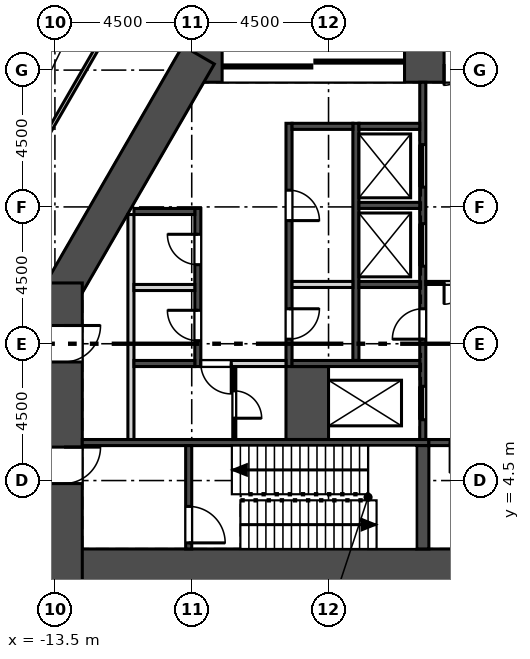
"""IFC4 building model, lengths in metres.
Left out: names, types, materials, properties, quantities, classifications, styles, units other than length and angle.
Written with IfcOpenShell. Run it as: python <this file> out.ifc"""

import sys

from ifc_helpers import new_model, si_unit, direction, frame, frame_2d, origin, place, context, subcontext, project, spatial, rectangle, extrude, element, fill, save


model = new_model("IFC4")
c1 = context("Model", 3, precision=1e-05, world=origin(), true_north=direction((0.0, 1.0)))
c2 = subcontext(c1, "Body", "Model", "MODEL_VIEW")
j1 = project(units=[si_unit("LENGTHUNIT", "METRE"), si_unit("PLANEANGLEUNIT", "RADIAN")], contexts=[c1])
p1 = place(None, origin())
s1 = spatial("IfcSite", under=j1, at=p1, CompositionType="ELEMENT")
p2 = place(p1, origin())
s2 = spatial("IfcBuilding", under=s1, at=p2, CompositionType="ELEMENT")
p3 = place(p2, frame((0.0, 0.0, 137.5)))
s3 = spatial("IfcBuildingStorey", under=s2, at=p3, CompositionType="ELEMENT", Elevation=137.5)
p4 = place(p3, frame((-13.8, 1.65, 0.0), z_axis=(0.0, 0.0, 1.0), x_axis=(1.0, 0.0, 0.0)))
e1 = element("IfcWall", 1, at=p4, inside=s3, PredefinedType="SHEAR", context=c2, shape_type="SweptSolid", body=[
    extrude(rectangle(XDim=27.6, YDim=1.2, at=frame_2d((13.8, 0.0))), origin(), (0.0, 0.0, 1.0), 5.4),
])
p5 = place(p3, frame((9.296, 18.2, 0.0), z_axis=(0.0, 0.0, 1.0), x_axis=(-1.0, 0.0, 0.0)))
e2 = element("IfcWall", 2, at=p5, inside=s3, PredefinedType="SHEAR", context=c2, shape_type="SweptSolid", body=[
    extrude(rectangle(XDim=18.592, YDim=1.2, at=frame_2d((9.296, 0.0))), origin(), (0.0, 0.0, 1.0), 5.4),
])
p6 = place(p5, frame((8.596, 0.0, 0.0)))
e3 = element("IfcOpeningElement", 3, at=p6, cuts=e2, PredefinedType="OPENING", context=c2, shape_type="SweptSolid", body=[
    extrude(rectangle(XDim=1.4, YDim=2.1, at=frame_2d((0.7, 1.05))), frame((0.0, 0.61, 0.0), z_axis=(0.0, -1.0, 0.0), x_axis=(1.0, 0.0, 0.0)), (0.0, 0.0, 1.0), 1.22),
])
p7 = place(p5, frame((11.296, 0.0, 0.0)))
e4 = element("IfcOpeningElement", 4, at=p7, cuts=e2, PredefinedType="OPENING", context=c2, shape_type="SweptSolid", body=[
    extrude(rectangle(XDim=6.0, YDim=2.4, at=frame_2d((3.0, 1.2))), frame((0.0, 0.61, 0.0), z_axis=(0.0, -1.0, 0.0), x_axis=(1.0, 0.0, 0.0)), (0.0, 0.0, 1.0), 1.22),
])
p8 = place(p5, frame((1.296, 0.0, 0.0)))
e5 = element("IfcOpeningElement", 5, at=p8, cuts=e2, PredefinedType="OPENING", context=c2, shape_type="SweptSolid", body=[
    extrude(rectangle(XDim=6.0, YDim=2.4, at=frame_2d((3.0, 1.2))), frame((0.0, 0.61, 0.0), z_axis=(0.0, -1.0, 0.0), x_axis=(1.0, 0.0, 0.0)), (0.0, 0.0, 1.0), 1.22),
])
p9 = place(p3, frame((-8.777, 18.5, 0.0), z_axis=(0.0, 0.0, 1.0), x_axis=(-0.499998513025, -0.866026262288, 0.0)))
e6 = element("IfcWall", 6, at=p9, inside=s3, PredefinedType="SHEAR", context=c2, shape_type="SweptSolid", body=[
    extrude(rectangle(XDim=9.008, YDim=1.2, at=frame_2d((4.504, 0.0))), origin(), (0.0, 0.0, 1.0), 5.4),
])
p10 = place(p3, frame((-13.2, 10.999, 0.0), z_axis=(0.0, 0.0, 1.0), x_axis=(0.0, -1.0, 0.0)))
e7 = element("IfcWall", 7, at=p10, inside=s3, PredefinedType="SHEAR", context=c2, shape_type="SweptSolid", body=[
    extrude(rectangle(XDim=9.949, YDim=1.2, at=frame_2d((4.975, 0.0))), origin(), (0.0, 0.0, 1.0), 5.4),
])
p11 = place(p10, frame((5.399, 0.0, 0.0)))
e8 = element("IfcOpeningElement", 8, at=p11, cuts=e7, PredefinedType="OPENING", context=c2, shape_type="SweptSolid", body=[
    extrude(rectangle(XDim=1.2, YDim=2.1, at=frame_2d((0.6, 1.05))), frame((0.0, 0.61, 0.0), z_axis=(0.0, -1.0, 0.0), x_axis=(1.0, 0.0, 0.0)), (0.0, 0.0, 1.0), 1.22),
])
p12 = place(p10, frame((1.399, 0.0, 0.0)))
e9 = element("IfcOpeningElement", 9, at=p12, cuts=e7, PredefinedType="OPENING", context=c2, shape_type="SweptSolid", body=[
    extrude(rectangle(XDim=1.2, YDim=2.1, at=frame_2d((0.6, 1.05))), frame((0.0, 0.61, 0.0), z_axis=(0.0, -1.0, 0.0), x_axis=(1.0, 0.0, 0.0)), (0.0, 0.0, 1.0), 1.22),
])
p13 = place(p3, frame((-11.0, 5.85, 0.0), z_axis=(0.0, 0.0, 1.0), x_axis=(0.0, 1.0, 0.0)))
e10 = element("IfcWall", 10, at=p13, inside=s3, PredefinedType="SOLIDWALL", context=c2, shape_type="SweptSolid", body=[
    extrude(rectangle(XDim=7.4, YDim=0.2, at=frame_2d((3.7, 0.0))), origin(), (0.0, 0.0, 1.0), 5.0),
])
p14 = place(p3, frame((-8.8, 8.25, -0.4), z_axis=(0.0, 0.0, 1.0), x_axis=(0.0, 1.0, 0.0)))
e11 = element("IfcWall", 11, at=p14, inside=s3, PredefinedType="SOLIDWALL", context=c2, shape_type="SweptSolid", body=[
    extrude(rectangle(XDim=5.2, YDim=0.2, at=frame_2d((2.6, 0.0))), origin(), (0.0, 0.0, 1.0), 5.4),
])
p15 = place(p14, frame((0.85, 0.0, 0.4)))
e12 = element("IfcOpeningElement", 12, at=p15, cuts=e11, PredefinedType="OPENING", context=c2, shape_type="SweptSolid", body=[
    extrude(rectangle(XDim=1.0, YDim=2.1, at=frame_2d((0.5, 1.05))), frame((0.0, 0.11, 0.0), z_axis=(0.0, -1.0, 0.0), x_axis=(1.0, 0.0, 0.0)), (0.0, 0.0, 1.0), 0.22),
])
p16 = place(p14, frame((3.35, 0.0, 0.4)))
e13 = element("IfcOpeningElement", 13, at=p16, cuts=e11, PredefinedType="OPENING", context=c2, shape_type="SweptSolid", body=[
    extrude(rectangle(XDim=1.0, YDim=2.1, at=frame_2d((0.5, 1.05))), frame((0.0, 0.11, 0.0), z_axis=(0.0, -1.0, 0.0), x_axis=(1.0, 0.0, 0.0)), (0.0, 0.0, 1.0), 0.22),
])
p17 = place(p3, frame((-5.8, 8.25, -0.4), z_axis=(0.0, 0.0, 1.0), x_axis=(0.0, 1.0, 0.0)))
e14 = element("IfcWall", 14, at=p17, inside=s3, PredefinedType="SOLIDWALL", context=c2, shape_type="SweptSolid", body=[
    extrude(rectangle(XDim=8.0, YDim=0.2, at=frame_2d((4.0, 0.0))), origin(), (0.0, 0.0, 1.0), 5.4),
])
p18 = place(p17, frame((0.9, 0.0, 0.4)))
e15 = element("IfcOpeningElement", 15, at=p18, cuts=e14, PredefinedType="OPENING", context=c2, shape_type="SweptSolid", body=[
    extrude(rectangle(XDim=1.0, YDim=2.1, at=frame_2d((0.5, 1.05))), frame((0.0, 0.11, 0.0), z_axis=(0.0, -1.0, 0.0), x_axis=(1.0, 0.0, 0.0)), (0.0, 0.0, 1.0), 0.22),
])
p19 = place(p17, frame((4.8, 0.0, 0.4)))
e16 = element("IfcOpeningElement", 16, at=p19, cuts=e14, PredefinedType="OPENING", context=c2, shape_type="SweptSolid", body=[
    extrude(rectangle(XDim=1.0, YDim=2.1, at=frame_2d((0.5, 1.05))), frame((0.0, 0.11, 0.0), z_axis=(0.0, -1.0, 0.0), x_axis=(1.0, 0.0, 0.0)), (0.0, 0.0, 1.0), 0.22),
])
p20 = place(p3, frame((-3.6, 8.45, -0.4), z_axis=(0.0, 0.0, 1.0), x_axis=(0.0, 1.0, 0.0)))
e17 = element("IfcWall", 17, at=p20, inside=s3, PredefinedType="SOLIDWALL", context=c2, shape_type="SweptSolid", body=[
    extrude(rectangle(XDim=7.8, YDim=0.2, at=frame_2d((3.9, 0.0))), origin(), (0.0, 0.0, 1.0), 5.4),
])
p21 = place(p3, frame((-1.4, 5.85, -0.4), z_axis=(0.0, 0.0, 1.0), x_axis=(0.0, 1.0, 0.0)))
e18 = element("IfcWall", 18, at=p21, inside=s3, PredefinedType="SOLIDWALL", context=c2, shape_type="SweptSolid", body=[
    extrude(rectangle(XDim=11.75, YDim=0.2, at=frame_2d((5.875, 0.0))), origin(), (0.0, 0.0, 1.0), 5.4),
])
p22 = place(p21, frame((5.7, 0.0, 0.4)))
e19 = element("IfcOpeningElement", 19, at=p22, cuts=e18, PredefinedType="OPENING", context=c2, shape_type="SweptSolid", body=[
    extrude(rectangle(XDim=1.4, YDim=2.1, at=frame_2d((0.7, 1.05))), frame((0.0, 0.11, 0.0), z_axis=(0.0, -1.0, 0.0), x_axis=(1.0, 0.0, 0.0)), (0.0, 0.0, 1.0), 0.22),
])
p23 = place(p21, frame((8.3, 0.0, 0.4)))
e20 = element("IfcOpeningElement", 20, at=p23, cuts=e18, PredefinedType="OPENING", context=c2, shape_type="SweptSolid", body=[
    extrude(rectangle(XDim=1.4, YDim=2.1, at=frame_2d((0.7, 1.05))), frame((0.0, 0.11, 0.0), z_axis=(0.0, -1.0, 0.0), x_axis=(1.0, 0.0, 0.0)), (0.0, 0.0, 1.0), 0.22),
])
p24 = place(p21, frame((0.65, 0.0, 0.4)))
e21 = element("IfcOpeningElement", 21, at=p24, cuts=e18, PredefinedType="OPENING", context=c2, shape_type="SweptSolid", body=[
    extrude(rectangle(XDim=1.1, YDim=2.1, at=frame_2d((0.55, 1.05))), frame((0.0, 0.11, 0.0), z_axis=(0.0, -1.0, 0.0), x_axis=(1.0, 0.0, 0.0)), (0.0, 0.0, 1.0), 0.22),
])
p25 = place(p21, frame((3.3, 0.0, 0.4)))
e22 = element("IfcOpeningElement", 22, at=p25, cuts=e18, PredefinedType="OPENING", context=c2, shape_type="SweptSolid", body=[
    extrude(rectangle(XDim=1.0, YDim=2.1, at=frame_2d((0.5, 1.05))), frame((0.0, 0.11, 0.0), z_axis=(0.0, -1.0, 0.0), x_axis=(1.0, 0.0, 0.0)), (0.0, 0.0, 1.0), 0.22),
])
p26 = place(p3, frame((-5.2, 5.85, -0.4), z_axis=(0.0, 0.0, 1.0), x_axis=(0.0, 1.0, 0.0)))
e23 = element("IfcWall", 23, at=p26, inside=s3, PredefinedType="SOLIDWALL", context=c2, shape_type="SweptSolid", body=[
    extrude(rectangle(XDim=2.4, YDim=1.4, at=frame_2d((1.2, 0.0))), origin(), (0.0, 0.0, 1.0), 5.4),
])
p27 = place(p3, frame((-10.9, 8.35, -0.4), z_axis=(0.0, 0.0, 1.0), x_axis=(1.0, 0.0, 0.0)))
e24 = element("IfcWall", 24, at=p27, inside=s3, PredefinedType="SOLIDWALL", context=c2, shape_type="SweptSolid", body=[
    extrude(rectangle(XDim=2.0, YDim=0.2, at=frame_2d((1.0, 0.0))), origin(), (0.0, 0.0, 1.0), 5.4),
])
p28 = place(p3, frame((-5.7, 8.35, -0.4), z_axis=(0.0, 0.0, 1.0), x_axis=(1.0, 0.0, 0.0)))
e25 = element("IfcWall", 25, at=p28, inside=s3, PredefinedType="SOLIDWALL", context=c2, shape_type="SweptSolid", body=[
    extrude(rectangle(XDim=4.2, YDim=0.2, at=frame_2d((2.1, 0.0))), origin(), (0.0, 0.0, 1.0), 5.4),
])
p29 = place(p3, frame((-12.6, 5.75, -0.4), z_axis=(0.0, 0.0, 1.0), x_axis=(1.0, 0.0, 0.0)))
e26 = element("IfcWall", 26, at=p29, inside=s3, PredefinedType="SOLIDWALL", context=c2, shape_type="SweptSolid", body=[
    extrude(rectangle(XDim=11.4, YDim=0.2, at=frame_2d((5.7, 0.0))), origin(), (0.0, 0.0, 1.0), 5.4),
])
p30 = place(p3, frame((-1.2, 5.75, -0.4), z_axis=(0.0, 0.0, 1.0), x_axis=(1.0, 0.0, 0.0)))
e27 = element("IfcWall", 27, at=p30, inside=s3, PredefinedType="SOLIDWALL", context=c2, shape_type="SweptSolid", body=[
    extrude(rectangle(XDim=2.4, YDim=0.2, at=frame_2d((1.2, 0.0))), origin(), (0.0, 0.0, 1.0), 5.4),
])
p31 = place(p30, frame((0.7, 0.0, 0.4)))
e28 = element("IfcOpeningElement", 28, at=p31, cuts=e27, PredefinedType="OPENING", context=c2, shape_type="SweptSolid", body=[
    extrude(rectangle(XDim=1.0, YDim=2.1, at=frame_2d((0.5, 1.05))), frame((0.0, 0.11, 0.0), z_axis=(0.0, -1.0, 0.0), x_axis=(1.0, 0.0, 0.0)), (0.0, 0.0, 1.0), 0.22),
])
p32 = place(p3, frame((-9.1, 2.25, -0.4), z_axis=(0.0, 0.0, 1.0), x_axis=(0.0, 1.0, 0.0)))
e29 = element("IfcWall", 29, at=p32, inside=s3, PredefinedType="SOLIDWALL", context=c2, shape_type="SweptSolid", body=[
    extrude(rectangle(XDim=3.4, YDim=0.2, at=frame_2d((1.7, 0.0))), origin(), (0.0, 0.0, 1.0), 5.4),
])
p33 = place(p32, frame((0.2, 0.0, 0.4)))
e30 = element("IfcOpeningElement", 30, at=p33, cuts=e29, PredefinedType="OPENING", context=c2, shape_type="SweptSolid", body=[
    extrude(rectangle(XDim=1.2, YDim=2.1, at=frame_2d((0.6, 1.05))), frame((0.0, 0.11, 0.0), z_axis=(0.0, -1.0, 0.0), x_axis=(1.0, 0.0, 0.0)), (0.0, 0.0, 1.0), 0.22),
])
p34 = place(p3, frame((-1.4, 2.25, -0.4), z_axis=(0.0, 0.0, 1.0), x_axis=(0.0, 1.0, 0.0)))
e31 = element("IfcWall", 31, at=p34, inside=s3, PredefinedType="SOLIDWALL", context=c2, shape_type="SweptSolid", body=[
    extrude(rectangle(XDim=3.4, YDim=0.4, at=frame_2d((1.7, 0.0))), origin(), (0.0, 0.0, 1.0), 5.4),
])
p35 = place(p3, frame((-10.9, 10.85, 0.0), z_axis=(0.0, 0.0, 1.0), x_axis=(1.0, 0.0, 0.0)))
e32 = element("IfcWall", 32, at=p35, inside=s3, PredefinedType="SOLIDWALL", context=c2, shape_type="SweptSolid", body=[
    extrude(rectangle(XDim=2.0, YDim=0.2, at=frame_2d((1.0, 0.0))), origin(), (0.0, 0.0, 1.0), 5.0),
])
p36 = place(p3, frame((-10.9, 13.35, -0.4), z_axis=(0.0, 0.0, 1.0), x_axis=(1.0, 0.0, 0.0)))
e33 = element("IfcWall", 33, at=p36, inside=s3, PredefinedType="SOLIDWALL", context=c2, shape_type="SweptSolid", body=[
    extrude(rectangle(XDim=2.0, YDim=0.2, at=frame_2d((1.0, 0.0))), origin(), (0.0, 0.0, 1.0), 5.4),
])
p37 = place(p3, frame((-5.7, 10.95, 0.0), z_axis=(0.0, 0.0, 1.0), x_axis=(1.0, 0.0, 0.0)))
e34 = element("IfcWall", 34, at=p37, inside=s3, PredefinedType="SOLIDWALL", context=c2, shape_type="SweptSolid", body=[
    extrude(rectangle(XDim=2.0, YDim=0.2, at=frame_2d((1.0, 0.0))), origin(), (0.0, 0.0, 1.0), 5.0),
])
for number, where, z_axis, x_axis in (
    (35, (-5.7, 16.15, -0.4), (0.0, 0.0, 1.0), (1.0, 0.0, 0.0)),
    (36, (-3.5, 10.95, -0.4), (0.0, 0.0, 1.0), (1.0, 0.0, 0.0)),
    (37, (-3.5, 13.55, -0.4), (0.0, 0.0, 1.0), (1.0, 0.0, 0.0)),
    (38, (-3.5, 16.15, -0.4), (0.0, 0.0, 1.0), (1.0, 0.0, 0.0)),
):
    element("IfcWall", number, at=place(p3, frame(where, z_axis=z_axis, x_axis=x_axis)), inside=s3, PredefinedType="SOLIDWALL", context=c2, shape_type="SweptSolid", body=[
        extrude(rectangle(XDim=2.0, YDim=0.2, at=frame_2d((1.0, 0.0))), origin(), (0.0, 0.0, 1.0), 5.4),
    ])
p38 = place(p3, frame((-7.6, 5.85, 0.0), z_axis=(0.0, 0.0, 1.0), x_axis=(0.0, 1.0, 0.0)))
e39 = element("IfcWall", 39, at=p38, inside=s3, PredefinedType="PARTITIONING", context=c2, shape_type="SweptSolid", body=[
    extrude(rectangle(XDim=2.4, YDim=0.1, at=frame_2d((1.2, 0.0))), origin(), (0.0, 0.0, 1.0), 5.0),
])
p39 = place(p38, frame((0.7, 0.0, 0.0)))
e40 = element("IfcOpeningElement", 40, at=p39, cuts=e39, PredefinedType="OPENING", context=c2, shape_type="SweptSolid", body=[
    extrude(rectangle(XDim=0.9, YDim=2.1, at=frame_2d((0.45, 1.05))), frame((0.0, 0.06, 0.0), z_axis=(0.0, -1.0, 0.0), x_axis=(1.0, 0.0, 0.0)), (0.0, 0.0, 1.0), 0.12),
])
p40 = place(p3, frame((-8.7, 8.35, 0.0), z_axis=(0.0, 0.0, 1.0), x_axis=(1.0, 0.0, 0.0)))
e41 = element("IfcWall", 41, at=p40, inside=s3, PredefinedType="SOLIDWALL", context=c2, shape_type="SweptSolid", body=[
    extrude(rectangle(XDim=2.8, YDim=0.2, at=frame_2d((1.4, 0.0))), origin(), (0.0, 0.0, 1.0), 5.0),
])
p41 = place(p40, origin())
e42 = element("IfcOpeningElement", 42, at=p41, cuts=e41, PredefinedType="OPENING", context=c2, shape_type="SweptSolid", body=[
    extrude(rectangle(XDim=1.0, YDim=2.1, at=frame_2d((0.5, 1.05))), frame((0.0, 0.11, 0.0), z_axis=(0.0, -1.0, 0.0), x_axis=(1.0, 0.0, 0.0)), (0.0, 0.0, 1.0), 0.22),
])
p42 = place(p3, frame((-1.3, 11.0, 0.0), z_axis=(0.0, 0.0, 1.0), x_axis=(1.0, 0.0, 0.0)))
e43 = element("IfcWall", 43, at=p42, inside=s3, PredefinedType="PARTITIONING", context=c2, shape_type="SweptSolid", body=[
    extrude(rectangle(XDim=2.6, YDim=0.1, at=frame_2d((1.3, 0.0))), origin(), (0.0, 0.0, 1.0), 5.0),
])
p43 = place(p42, frame((0.6, 0.0, 0.0)))
e44 = element("IfcOpeningElement", 44, at=p43, cuts=e43, PredefinedType="OPENING", context=c2, shape_type="SweptSolid", body=[
    extrude(rectangle(XDim=1.4, YDim=2.1, at=frame_2d((0.7, 1.05))), frame((0.0, 0.06, 0.0), z_axis=(0.0, -1.0, 0.0), x_axis=(1.0, 0.0, 0.0)), (0.0, 0.0, 1.0), 0.12),
])
p44 = place(p3, frame((-16.2, 11.642, 0.0), z_axis=(0.0, 0.0, 1.0), x_axis=(0.499989328978, 0.866031564614, 0.0)))
e45 = element("IfcWall", 45, at=p44, inside=s3, PredefinedType="PARTITIONING", context=c2, shape_type="SweptSolid", body=[
    extrude(rectangle(XDim=8.156, YDim=0.125, at=frame_2d((4.078, 0.0))), origin(), (0.0, 0.0, 1.0), 5.0),
])
p45 = place(p22, origin())
e46 = element("IfcDoor", 46, at=p45, inside=s3, OperationType="SLIDING_TO_LEFT", PredefinedType="DOOR", context=c2, shape_type="SweptSolid", body=[
    extrude(rectangle(XDim=1.4, YDim=2.1, at=frame_2d((0.7, 1.05))), frame((0.0, 0.025, 0.0), z_axis=(0.0, -1.0, 0.0), x_axis=(1.0, 0.0, 0.0)), (0.0, 0.0, 1.0), 0.05),
])
fill(e19, e46)
p46 = place(p23, origin())
e47 = element("IfcDoor", 47, at=p46, inside=s3, OperationType="SLIDING_TO_LEFT", PredefinedType="DOOR", context=c2, shape_type="SweptSolid", body=[
    extrude(rectangle(XDim=1.4, YDim=2.1, at=frame_2d((0.7, 1.05))), frame((0.0, 0.025, 0.0), z_axis=(0.0, -1.0, 0.0), x_axis=(1.0, 0.0, 0.0)), (0.0, 0.0, 1.0), 0.05),
])
fill(e20, e47)
p47 = place(p24, origin())
e48 = element("IfcDoor", 48, at=p47, inside=s3, OperationType="SLIDING_TO_RIGHT", PredefinedType="DOOR", context=c2, shape_type="SweptSolid", body=[
    extrude(rectangle(XDim=1.1, YDim=2.1, at=frame_2d((0.55, 1.05))), frame((0.0, 0.025, 0.0), z_axis=(0.0, -1.0, 0.0), x_axis=(1.0, 0.0, 0.0)), (0.0, 0.0, 1.0), 0.05),
])
fill(e21, e48)
p48 = place(p15, origin())
e49 = element("IfcDoor", 49, at=p48, inside=s3, OperationType="SINGLE_SWING_RIGHT", PredefinedType="DOOR", context=c2, shape_type="SweptSolid", body=[
    extrude(rectangle(XDim=1.0, YDim=2.1, at=frame_2d((0.5, 1.05))), frame((0.0, 0.025, 0.0), z_axis=(0.0, -1.0, 0.0), x_axis=(1.0, 0.0, 0.0)), (0.0, 0.0, 1.0), 0.05),
])
fill(e12, e49)
p49 = place(p16, origin())
e50 = element("IfcDoor", 50, at=p49, inside=s3, OperationType="SINGLE_SWING_RIGHT", PredefinedType="DOOR", context=c2, shape_type="SweptSolid", body=[
    extrude(rectangle(XDim=1.0, YDim=2.1, at=frame_2d((0.5, 1.05))), frame((0.0, 0.025, 0.0), z_axis=(0.0, -1.0, 0.0), x_axis=(1.0, 0.0, 0.0)), (0.0, 0.0, 1.0), 0.05),
])
fill(e13, e50)
p50 = place(p18, frame((1.0, 0.0, 0.0), z_axis=(0.0, 0.0, 1.0), x_axis=(-1.0, 0.0, 0.0)))
e51 = element("IfcDoor", 51, at=p50, inside=s3, OperationType="SINGLE_SWING_LEFT", PredefinedType="DOOR", context=c2, shape_type="SweptSolid", body=[
    extrude(rectangle(XDim=1.0, YDim=2.1, at=frame_2d((0.5, 1.05))), frame((0.0, 0.025, 0.0), z_axis=(0.0, -1.0, 0.0), x_axis=(1.0, 0.0, 0.0)), (0.0, 0.0, 1.0), 0.05),
])
fill(e15, e51)
p51 = place(p19, frame((1.0, 0.0, 0.0), z_axis=(0.0, 0.0, 1.0), x_axis=(-1.0, 0.0, 0.0)))
e52 = element("IfcDoor", 52, at=p51, inside=s3, OperationType="SINGLE_SWING_RIGHT", PredefinedType="DOOR", context=c2, shape_type="SweptSolid", body=[
    extrude(rectangle(XDim=1.0, YDim=2.1, at=frame_2d((0.5, 1.05))), frame((0.0, 0.025, 0.0), z_axis=(0.0, -1.0, 0.0), x_axis=(1.0, 0.0, 0.0)), (0.0, 0.0, 1.0), 0.05),
])
fill(e16, e52)
p52 = place(p25, origin())
e53 = element("IfcDoor", 53, at=p52, inside=s3, OperationType="SINGLE_SWING_LEFT", PredefinedType="DOOR", context=c2, shape_type="SweptSolid", body=[
    extrude(rectangle(XDim=1.0, YDim=2.1, at=frame_2d((0.5, 1.05))), frame((0.0, 0.025, 0.0), z_axis=(0.0, -1.0, 0.0), x_axis=(1.0, 0.0, 0.0)), (0.0, 0.0, 1.0), 0.05),
])
fill(e22, e53)
p53 = place(p41, frame((1.0, 0.0, 0.0), z_axis=(0.0, 0.0, 1.0), x_axis=(-1.0, 0.0, 0.0)))
e54 = element("IfcDoor", 54, at=p53, inside=s3, OperationType="SINGLE_SWING_LEFT", PredefinedType="DOOR", context=c2, shape_type="SweptSolid", body=[
    extrude(rectangle(XDim=1.0, YDim=2.1, at=frame_2d((0.5, 1.05))), frame((0.0, 0.025, 0.0), z_axis=(0.0, -1.0, 0.0), x_axis=(1.0, 0.0, 0.0)), (0.0, 0.0, 1.0), 0.05),
])
fill(e42, e54)
p54 = place(p39, frame((0.9, 0.0, 0.0), z_axis=(0.0, 0.0, 1.0), x_axis=(-1.0, 0.0, 0.0)))
e55 = element("IfcDoor", 55, at=p54, inside=s3, OperationType="SINGLE_SWING_RIGHT", PredefinedType="DOOR", context=c2, shape_type="SweptSolid", body=[
    extrude(rectangle(XDim=0.9, YDim=2.1, at=frame_2d((0.45, 1.05))), frame((0.0, 0.025, 0.0), z_axis=(0.0, -1.0, 0.0), x_axis=(1.0, 0.0, 0.0)), (0.0, 0.0, 1.0), 0.05),
])
fill(e40, e55)
p55 = place(p11, origin())
e56 = element("IfcDoor", 56, at=p55, inside=s3, OperationType="SINGLE_SWING_LEFT", PredefinedType="DOOR", context=c2, shape_type="SweptSolid", body=[
    extrude(rectangle(XDim=1.2, YDim=2.1, at=frame_2d((0.6, 1.05))), frame((0.0, 0.025, 0.0), z_axis=(0.0, -1.0, 0.0), x_axis=(1.0, 0.0, 0.0)), (0.0, 0.0, 1.0), 0.05),
])
fill(e8, e56)
p56 = place(p33, frame((1.2, 0.0, 0.0), z_axis=(0.0, 0.0, 1.0), x_axis=(-1.0, 0.0, 0.0)))
e57 = element("IfcDoor", 57, at=p56, inside=s3, OperationType="SINGLE_SWING_RIGHT", PredefinedType="DOOR", context=c2, shape_type="SweptSolid", body=[
    extrude(rectangle(XDim=1.2, YDim=2.1, at=frame_2d((0.6, 1.05))), frame((0.0, 0.025, 0.0), z_axis=(0.0, -1.0, 0.0), x_axis=(1.0, 0.0, 0.0)), (0.0, 0.0, 1.0), 0.05),
])
fill(e30, e57)
p57 = place(p12, origin())
e58 = element("IfcDoor", 58, at=p57, inside=s3, OperationType="SINGLE_SWING_LEFT", PredefinedType="DOOR", context=c2, shape_type="SweptSolid", body=[
    extrude(rectangle(XDim=1.2, YDim=2.1, at=frame_2d((0.6, 1.05))), frame((0.0, 0.025, 0.0), z_axis=(0.0, -1.0, 0.0), x_axis=(1.0, 0.0, 0.0)), (0.0, 0.0, 1.0), 0.05),
])
fill(e9, e58)
p58 = place(p43, frame((1.4, 0.0, 0.0), z_axis=(0.0, 0.0, 1.0), x_axis=(-1.0, 0.0, 0.0)))
e59 = element("IfcDoor", 59, at=p58, inside=s3, OperationType="DOUBLE_DOOR_SINGLE_SWING", PredefinedType="DOOR", context=c2, shape_type="SweptSolid", body=[
    extrude(rectangle(XDim=1.4, YDim=2.1, at=frame_2d((0.7, 1.05))), frame((0.0, 0.025, 0.0), z_axis=(0.0, -1.0, 0.0), x_axis=(1.0, 0.0, 0.0)), (0.0, 0.0, 1.0), 0.05),
])
fill(e44, e59)
p59 = place(p6, origin())
e60 = element("IfcDoor", 60, at=p59, inside=s3, OperationType="DOUBLE_DOOR_SINGLE_SWING", PredefinedType="DOOR", context=c2, shape_type="SweptSolid", body=[
    extrude(rectangle(XDim=1.4, YDim=2.1, at=frame_2d((0.7, 1.05))), frame((0.0, 0.025, 0.0), z_axis=(0.0, -1.0, 0.0), x_axis=(1.0, 0.0, 0.0)), (0.0, 0.0, 1.0), 0.05),
])
fill(e3, e60)
p60 = place(p7, origin())
e61 = element("IfcDoor", 61, at=p60, inside=s3, OperationType="DOUBLE_DOOR_SLIDING", PredefinedType="DOOR", context=c2, shape_type="SweptSolid", body=[
    extrude(rectangle(XDim=6.0, YDim=2.4, at=frame_2d((3.0, 1.2))), frame((0.0, 0.025, 0.0), z_axis=(0.0, -1.0, 0.0), x_axis=(1.0, 0.0, 0.0)), (0.0, 0.0, 1.0), 0.05),
])
fill(e4, e61)
save(model, sys.argv[1])
